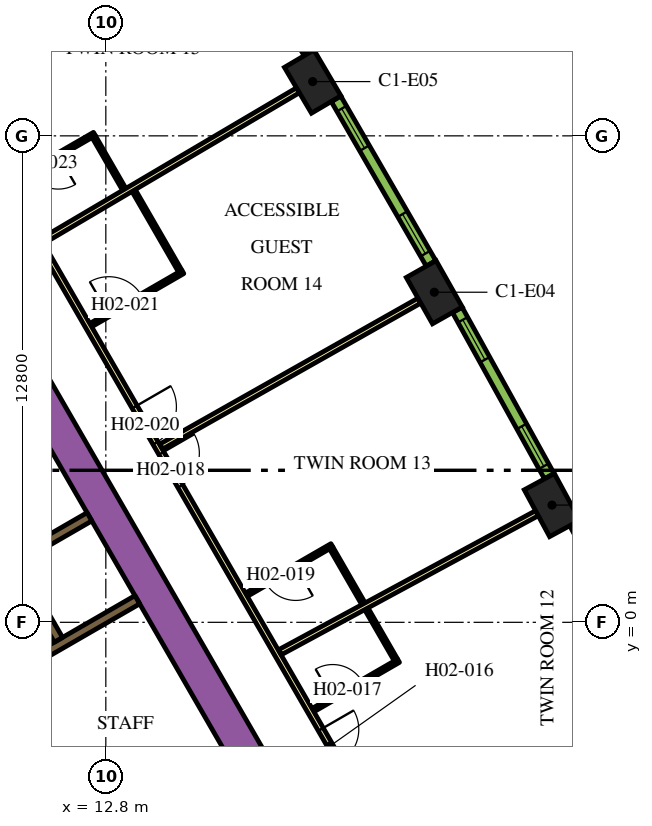
"""IFC4 building model, lengths in metres.
Left out: names, types, materials, properties, quantities, classifications, styles, units other than length and angle.
Written with IfcOpenShell. Run it as: python <this file> out.ifc"""

import sys

from ifc_helpers import new_model, si_unit, direction, frame, frame_2d, origin, origin_2d, place, context, subcontext, project, spatial, rectangle, extrude, element, fill, save


model = new_model("IFC4")
c1 = context("Model", 3, precision=1e-05, world=origin(), true_north=direction((0.0, 1.0)))
c2 = subcontext(c1, "Body", "Model", "MODEL_VIEW")
j1 = project(units=[si_unit("LENGTHUNIT", "METRE"), si_unit("PLANEANGLEUNIT", "RADIAN")], contexts=[c1])
p1 = place(None, origin())
s1 = spatial("IfcSite", under=j1, at=p1, CompositionType="ELEMENT")
p2 = place(p1, origin())
s2 = spatial("IfcBuilding", under=s1, at=p2, CompositionType="ELEMENT")
p3 = place(p2, frame((0.0, 0.0, 43.2)))
s3 = spatial("IfcBuildingStorey", under=s2, at=p3, CompositionType="ELEMENT", Elevation=43.2)
for number, where, z_axis, x_axis in (
    (1, (24.54, 3.085, 0.0), (0.0, 0.0, 1.0), (-0.476, 0.88, 0.0)),
    (2, (21.443, 8.685, 0.0), (0.0, 0.0, 1.0), (-0.492, 0.871, 0.0)),
    (3, (18.243, 14.228, 0.0), (0.0, 0.0, 1.0), (-0.508, 0.861, 0.0)),
):
    element("IfcColumn", number, at=place(p3, frame(where, z_axis=z_axis, x_axis=x_axis)), inside=s3, PredefinedType="COLUMN", context=c2, shape_type="SweptSolid", body=[
        extrude(rectangle(XDim=1.4, YDim=0.9, at=origin_2d()), origin(), (0.0, 0.0, 1.0), 3.9),
    ])
p4 = place(p3, frame((6.776, 13.364, 0.0), z_axis=(0.0, 0.0, 1.0), x_axis=(0.500004177138, -0.8660229921, 0.0)))
e4 = element("IfcWall", 4, at=p4, inside=s3, PredefinedType="SOLIDWALL", context=c2, shape_type="SweptSolid", body=[
    extrude(rectangle(XDim=20.204, YDim=0.9, at=frame_2d((10.102, 0.0))), origin(), (0.0, 0.0, 1.0), 3.9),
])
p5 = place(p3, frame((8.334, -2.964, 0.0), z_axis=(0.0, 0.0, 1.0), x_axis=(0.866016039709, -0.500016218704, 0.0)))
e5 = element("IfcWall", 5, at=p5, inside=s3, PredefinedType="SOLIDWALL", context=c2, shape_type="SweptSolid", body=[
    extrude(rectangle(XDim=7.05, YDim=0.25, at=frame_2d((3.525, 0.0))), origin(), (0.0, 0.0, 1.0), 3.9),
])
p6 = place(p3, frame((10.464, 1.677, 0.0), z_axis=(0.0, 0.0, 1.0), x_axis=(0.86605622881, 0.499946605688, 0.0)))
e6 = element("IfcWall", 6, at=p6, inside=s3, PredefinedType="SOLIDWALL", context=c2, shape_type="SweptSolid", body=[
    extrude(rectangle(XDim=2.2, YDim=0.25, at=frame_2d((1.1, 0.0))), origin(), (0.0, 0.0, 1.0), 3.9),
])
p7 = place(p3, frame((13.629, 0.594, 0.0), z_axis=(0.0, 0.0, 1.0), x_axis=(-0.86602790099, -0.499995674689, 0.0)))
e7 = element("IfcWall", 7, at=p7, inside=s3, PredefinedType="SOLIDWALL", context=c2, shape_type="SweptSolid", body=[
    extrude(rectangle(XDim=3.146, YDim=0.25, at=frame_2d((1.573, 0.0))), origin(), (0.0, 0.0, 1.0), 3.9),
])
p8 = place(p3, frame((11.553, -0.46, 0.0), z_axis=(0.0, 0.0, 1.0), x_axis=(-0.500006514828, 0.866021642414, 0.0)))
e8 = element("IfcWall", 8, at=p8, inside=s3, PredefinedType="SOLIDWALL", context=c2, shape_type="SweptSolid", body=[
    extrude(rectangle(XDim=12.35, YDim=0.25, at=frame_2d((6.175, 0.0))), origin(), (0.0, 0.0, 1.0), 3.9),
])
p9 = place(p8, frame((0.585, 0.0, 0.0)))
e9 = element("IfcOpeningElement", 9, at=p9, cuts=e8, PredefinedType="OPENING", context=c2, shape_type="SweptSolid", body=[
    extrude(rectangle(XDim=1.1, YDim=2.1, at=frame_2d((0.55, 1.05))), frame((0.0, 0.135, 0.0), z_axis=(0.0, -1.0, 0.0), x_axis=(1.0, 0.0, 0.0)), (0.0, 0.0, 1.0), 0.27),
])
p10 = place(p8, frame((3.105, 0.0, 0.0)))
e10 = element("IfcOpeningElement", 10, at=p10, cuts=e8, PredefinedType="OPENING", context=c2, shape_type="SweptSolid", body=[
    extrude(rectangle(XDim=1.1, YDim=2.1, at=frame_2d((0.55, 1.05))), frame((0.0, 0.135, 0.0), z_axis=(0.0, -1.0, 0.0), x_axis=(1.0, 0.0, 0.0)), (0.0, 0.0, 1.0), 0.27),
])
p11 = place(p8, frame((5.625, 0.0, 0.0)))
e11 = element("IfcOpeningElement", 11, at=p11, cuts=e8, PredefinedType="OPENING", context=c2, shape_type="SweptSolid", body=[
    extrude(rectangle(XDim=1.1, YDim=2.1, at=frame_2d((0.55, 1.05))), frame((0.0, 0.135, 0.0), z_axis=(0.0, -1.0, 0.0), x_axis=(1.0, 0.0, 0.0)), (0.0, 0.0, 1.0), 0.27),
])
p12 = place(p3, frame((6.163, 18.475, 0.0), z_axis=(0.0, 0.0, 1.0), x_axis=(0.500001317485, -0.866024643133, 0.0)))
e12 = element("IfcWall", 12, at=p12, inside=s3, PredefinedType="PARTITIONING", context=c2, shape_type="SweptSolid", body=[
    extrude(rectangle(XDim=25.767, YDim=0.15, at=frame_2d((12.883, 0.0))), origin(), (0.0, 0.0, 1.0), 2.75),
])
p13 = place(p12, frame((24.586, 0.0, 0.0)))
e13 = element("IfcOpeningElement", 13, at=p13, cuts=e12, PredefinedType="OPENING", context=c2, shape_type="SweptSolid", body=[
    extrude(rectangle(XDim=1.0, YDim=2.1, at=frame_2d((0.5, 1.05))), frame((0.0, 0.085, 0.0), z_axis=(0.0, -1.0, 0.0), x_axis=(1.0, 0.0, 0.0)), (0.0, 0.0, 1.0), 0.17),
])
p14 = place(p12, frame((16.196, 0.0, 0.0)))
e14 = element("IfcOpeningElement", 14, at=p14, cuts=e12, PredefinedType="OPENING", context=c2, shape_type="SweptSolid", body=[
    extrude(rectangle(XDim=1.0, YDim=2.1, at=frame_2d((0.5, 1.05))), frame((0.0, 0.085, 0.0), z_axis=(0.0, -1.0, 0.0), x_axis=(1.0, 0.0, 0.0)), (0.0, 0.0, 1.0), 0.17),
])
p15 = place(p12, frame((14.789, 0.0, 0.0)))
e15 = element("IfcOpeningElement", 15, at=p15, cuts=e12, PredefinedType="OPENING", context=c2, shape_type="SweptSolid", body=[
    extrude(rectangle(XDim=1.1, YDim=2.1, at=frame_2d((0.55, 1.05))), frame((0.0, 0.085, 0.0), z_axis=(0.0, -1.0, 0.0), x_axis=(1.0, 0.0, 0.0)), (0.0, 0.0, 1.0), 0.17),
])
p16 = place(p12, frame((3.698, 0.0, 0.0)))
e16 = element("IfcOpeningElement", 16, at=p16, cuts=e12, PredefinedType="OPENING", context=c2, shape_type="SweptSolid", body=[
    extrude(rectangle(XDim=1.0, YDim=2.1, at=frame_2d((0.5, 1.05))), frame((0.0, 0.085, 0.0), z_axis=(0.0, -1.0, 0.0), x_axis=(1.0, 0.0, 0.0)), (0.0, 0.0, 1.0), 0.17),
])
p17 = place(p12, frame((2.391, 0.0, 0.0)))
e17 = element("IfcOpeningElement", 17, at=p17, cuts=e12, PredefinedType="OPENING", context=c2, shape_type="SweptSolid", body=[
    extrude(rectangle(XDim=1.0, YDim=2.1, at=frame_2d((0.5, 1.05))), frame((0.0, 0.085, 0.0), z_axis=(0.0, -1.0, 0.0), x_axis=(1.0, 0.0, 0.0)), (0.0, 0.0, 1.0), 0.17),
])
p18 = place(p3, frame((17.856, 13.999, 0.0), z_axis=(0.0, 0.0, 1.0), x_axis=(-0.861371519381, -0.507975497047, 0.0)))
e18 = element("IfcWall", 18, at=p18, inside=s3, PredefinedType="PARTITIONING", context=c2, shape_type="SweptSolid", body=[
    extrude(rectangle(XDim=7.804, YDim=0.15, at=frame_2d((3.902, 0.0))), origin(), (0.0, 0.0, 1.0), 2.75),
])
p19 = place(p3, frame((21.052, 8.464, 0.0), z_axis=(0.0, 0.0, 1.0), x_axis=(-0.87059371954, -0.492002617368, 0.0)))
e19 = element("IfcWall", 19, at=p19, inside=s3, PredefinedType="PARTITIONING", context=c2, shape_type="SweptSolid", body=[
    extrude(rectangle(XDim=7.803, YDim=0.15, at=frame_2d((3.902, 0.0))), origin(), (0.0, 0.0, 1.0), 2.75),
])
p20 = place(p3, frame((27.134, -2.779, 0.0), z_axis=(0.0, 0.0, 1.0), x_axis=(-0.8882049501, -0.459447457951, 0.0)))
e20 = element("IfcWall", 20, at=p20, inside=s3, PredefinedType="PARTITIONING", context=c2, shape_type="SweptSolid", body=[
    extrude(rectangle(XDim=11.638, YDim=0.15, at=frame_2d((5.819, 0.0))), origin(), (0.0, 0.0, 1.0), 2.75),
])
p21 = place(p3, frame((24.145, 2.871, 0.0), z_axis=(0.0, 0.0, 1.0), x_axis=(-0.879551725039, -0.475803281809, 0.0)))
e21 = element("IfcWall", 21, at=p21, inside=s3, PredefinedType="PARTITIONING", context=c2, shape_type="SweptSolid", body=[
    extrude(rectangle(XDim=7.688, YDim=0.15, at=frame_2d((3.844, 0.0))), origin(), (0.0, 0.0, 1.0), 2.75),
])
p22 = place(p3, frame((18.25, -2.311, 0.0), z_axis=(0.0, 0.0, 1.0), x_axis=(0.866021400173, 0.500006934395, 0.0)))
e22 = element("IfcWall", 22, at=p22, inside=s3, PredefinedType="PARTITIONING", context=c2, shape_type="SweptSolid", body=[
    extrude(rectangle(XDim=2.6, YDim=0.1, at=frame_2d((1.3, 0.0))), origin(), (0.0, 0.0, 1.0), 2.75),
])
p23 = place(p22, frame((0.6, 0.0, 0.0)))
e23 = element("IfcOpeningElement", 23, at=p23, cuts=e22, PredefinedType="OPENING", context=c2, shape_type="SweptSolid", body=[
    extrude(rectangle(XDim=0.9, YDim=2.1, at=frame_2d((0.45, 1.05))), frame((0.0, 0.06, 0.0), z_axis=(0.0, -1.0, 0.0), x_axis=(1.0, 0.0, 0.0)), (0.0, 0.0, 1.0), 0.12),
])
p24 = place(p3, frame((20.434, -0.993, 0.0), z_axis=(0.0, 0.0, 1.0), x_axis=(-0.500086022567, 0.865975732936, 0.0)))
e24 = element("IfcWall", 24, at=p24, inside=s3, PredefinedType="PARTITIONING", context=c2, shape_type="SweptSolid", body=[
    extrude(rectangle(XDim=1.55, YDim=0.1, at=frame_2d((0.775, 0.0))), origin(), (0.0, 0.0, 1.0), 2.75),
])
p25 = place(p3, frame((18.749, 2.026, 0.0), z_axis=(0.0, 0.0, 1.0), x_axis=(-0.866021400173, -0.500006934395, 0.0)))
e25 = element("IfcWall", 25, at=p25, inside=s3, PredefinedType="PARTITIONING", context=c2, shape_type="SweptSolid", body=[
    extrude(rectangle(XDim=2.6, YDim=0.1, at=frame_2d((1.3, 0.0))), origin(), (0.0, 0.0, 1.0), 2.75),
])
p26 = place(p25, frame((1.1, 0.0, 0.0)))
e26 = element("IfcOpeningElement", 26, at=p26, cuts=e25, PredefinedType="OPENING", context=c2, shape_type="SweptSolid", body=[
    extrude(rectangle(XDim=0.9, YDim=2.1, at=frame_2d((0.45, 1.05))), frame((0.0, 0.06, 0.0), z_axis=(0.0, -1.0, 0.0), x_axis=(1.0, 0.0, 0.0)), (0.0, 0.0, 1.0), 0.12),
])
p27 = place(p3, frame((18.731, 1.958, 0.0), z_axis=(0.0, 0.0, 1.0), x_axis=(0.499976720371, -0.866038843867, 0.0)))
e27 = element("IfcWall", 27, at=p27, inside=s3, PredefinedType="PARTITIONING", context=c2, shape_type="SweptSolid", body=[
    extrude(rectangle(XDim=1.69, YDim=0.1, at=frame_2d((0.845, 0.0))), origin(), (0.0, 0.0, 1.0), 2.75),
])
p28 = place(p3, frame((12.402, 7.819, 0.0), z_axis=(0.0, 0.0, 1.0), x_axis=(0.866034573852, 0.49998411664, 0.0)))
e28 = element("IfcWall", 28, at=p28, inside=s3, PredefinedType="PARTITIONING", context=c2, shape_type="SweptSolid", body=[
    extrude(rectangle(XDim=2.8, YDim=0.1, at=frame_2d((1.4, 0.0))), origin(), (0.0, 0.0, 1.0), 2.75),
])
p29 = place(p28, frame((0.55, 0.0, 0.0)))
e29 = element("IfcOpeningElement", 29, at=p29, cuts=e28, PredefinedType="OPENING", context=c2, shape_type="SweptSolid", body=[
    extrude(rectangle(XDim=1.0, YDim=2.1, at=frame_2d((0.5, 1.05))), frame((0.0, 0.06, 0.0), z_axis=(0.0, -1.0, 0.0), x_axis=(1.0, 0.0, 0.0)), (0.0, 0.0, 1.0), 0.12),
])
p30 = place(p3, frame((14.759, 9.237, 0.0), z_axis=(0.0, 0.0, 1.0), x_axis=(-0.499943856944, 0.866057815567, 0.0)))
e30 = element("IfcWall", 30, at=p30, inside=s3, PredefinedType="PARTITIONING", context=c2, shape_type="SweptSolid", body=[
    extrude(rectangle(XDim=2.45, YDim=0.1, at=frame_2d((1.225, 0.0))), origin(), (0.0, 0.0, 1.0), 2.75),
])
p31 = place(p3, frame((12.5, 12.849, 0.0), z_axis=(0.0, 0.0, 1.0), x_axis=(-0.866021400173, -0.500006934395, 0.0)))
e31 = element("IfcWall", 31, at=p31, inside=s3, PredefinedType="PARTITIONING", context=c2, shape_type="SweptSolid", body=[
    extrude(rectangle(XDim=2.6, YDim=0.1, at=frame_2d((1.3, 0.0))), origin(), (0.0, 0.0, 1.0), 2.75),
])
p32 = place(p31, frame((1.1, 0.0, 0.0)))
e32 = element("IfcOpeningElement", 32, at=p32, cuts=e31, PredefinedType="OPENING", context=c2, shape_type="SweptSolid", body=[
    extrude(rectangle(XDim=0.9, YDim=2.1, at=frame_2d((0.45, 1.05))), frame((0.0, 0.06, 0.0), z_axis=(0.0, -1.0, 0.0), x_axis=(1.0, 0.0, 0.0)), (0.0, 0.0, 1.0), 0.12),
])
p33 = place(p3, frame((12.482, 12.781, 0.0), z_axis=(0.0, 0.0, 1.0), x_axis=(0.500061482766, -0.865989903783, 0.0)))
e33 = element("IfcWall", 33, at=p33, inside=s3, PredefinedType="PARTITIONING", context=c2, shape_type="SweptSolid", body=[
    extrude(rectangle(XDim=1.6, YDim=0.1, at=frame_2d((0.8, 0.0))), origin(), (0.0, 0.0, 1.0), 2.75),
])
p34 = place(p3, frame((27.475, -1.81, 0.0), z_axis=(0.0, 0.0, 1.0), x_axis=(-0.467629620899, 0.883924509026, 0.0)))
e34 = element("IfcWall", 34, at=p34, inside=s3, PredefinedType="SOLIDWALL", context=c2, shape_type="SweptSolid", body=[
    extrude(rectangle(XDim=4.998, YDim=0.29, at=frame_2d((2.499, 0.0))), origin(), (0.0, 0.0, 1.0), 3.65),
])
p35 = place(p34, frame((0.297, 0.0, 0.9)))
e35 = element("IfcOpeningElement", 35, at=p35, cuts=e34, PredefinedType="OPENING", context=c2, shape_type="SweptSolid", body=[
    extrude(rectangle(XDim=1.2, YDim=2.15, at=frame_2d((0.6, 1.075))), frame((0.0, 0.155, 0.0), z_axis=(0.0, -1.0, 0.0), x_axis=(1.0, 0.0, 0.0)), (0.0, 0.0, 1.0), 0.31),
])
p36 = place(p34, frame((3.501, 0.0, 0.9)))
e36 = element("IfcOpeningElement", 36, at=p36, cuts=e34, PredefinedType="OPENING", context=c2, shape_type="SweptSolid", body=[
    extrude(rectangle(XDim=1.2, YDim=2.15, at=frame_2d((0.6, 1.075))), frame((0.0, 0.155, 0.0), z_axis=(0.0, -1.0, 0.0), x_axis=(1.0, 0.0, 0.0)), (0.0, 0.0, 1.0), 0.31),
])
p37 = place(p3, frame((24.468, 3.846, 0.0), z_axis=(0.0, 0.0, 1.0), x_axis=(-0.483912572871, 0.875116347589, 0.0)))
e37 = element("IfcWall", 37, at=p37, inside=s3, PredefinedType="SOLIDWALL", context=c2, shape_type="SweptSolid", body=[
    extrude(rectangle(XDim=4.998, YDim=0.29, at=frame_2d((2.499, 0.0))), origin(), (0.0, 0.0, 1.0), 3.65),
])
p38 = place(p37, frame((0.297, 0.0, 0.9)))
e38 = element("IfcOpeningElement", 38, at=p38, cuts=e37, PredefinedType="OPENING", context=c2, shape_type="SweptSolid", body=[
    extrude(rectangle(XDim=1.2, YDim=2.15, at=frame_2d((0.6, 1.075))), frame((0.0, 0.155, 0.0), z_axis=(0.0, -1.0, 0.0), x_axis=(1.0, 0.0, 0.0)), (0.0, 0.0, 1.0), 0.31),
])
p39 = place(p37, frame((3.501, 0.0, 0.9)))
e39 = element("IfcOpeningElement", 39, at=p39, cuts=e37, PredefinedType="OPENING", context=c2, shape_type="SweptSolid", body=[
    extrude(rectangle(XDim=1.2, YDim=2.15, at=frame_2d((0.6, 1.075))), frame((0.0, 0.155, 0.0), z_axis=(0.0, -1.0, 0.0), x_axis=(1.0, 0.0, 0.0)), (0.0, 0.0, 1.0), 0.31),
])
p40 = place(p3, frame((21.357, 9.445, 0.0), z_axis=(0.0, 0.0, 1.0), x_axis=(-0.50002123722, 0.866013142123, 0.0)))
e40 = element("IfcWall", 40, at=p40, inside=s3, PredefinedType="SOLIDWALL", context=c2, shape_type="SweptSolid", body=[
    extrude(rectangle(XDim=4.998, YDim=0.29, at=frame_2d((2.499, 0.0))), origin(), (0.0, 0.0, 1.0), 3.65),
])
p41 = place(p40, frame((0.297, 0.0, 0.9)))
e41 = element("IfcOpeningElement", 41, at=p41, cuts=e40, PredefinedType="OPENING", context=c2, shape_type="SweptSolid", body=[
    extrude(rectangle(XDim=1.2, YDim=2.15, at=frame_2d((0.6, 1.075))), frame((0.0, 0.155, 0.0), z_axis=(0.0, -1.0, 0.0), x_axis=(1.0, 0.0, 0.0)), (0.0, 0.0, 1.0), 0.31),
])
p42 = place(p40, frame((3.501, 0.0, 0.9)))
e42 = element("IfcOpeningElement", 42, at=p42, cuts=e40, PredefinedType="OPENING", context=c2, shape_type="SweptSolid", body=[
    extrude(rectangle(XDim=1.2, YDim=2.15, at=frame_2d((0.6, 1.075))), frame((0.0, 0.155, 0.0), z_axis=(0.0, -1.0, 0.0), x_axis=(1.0, 0.0, 0.0)), (0.0, 0.0, 1.0), 0.31),
])
p43 = place(p3, frame((18.143, 14.986, 0.0), z_axis=(0.0, 0.0, 1.0), x_axis=(-0.515938796285, 0.856625448191, 0.0)))
e43 = element("IfcWall", 43, at=p43, inside=s3, PredefinedType="SOLIDWALL", context=c2, shape_type="SweptSolid", body=[
    extrude(rectangle(XDim=4.998, YDim=0.29, at=frame_2d((2.499, 0.0))), origin(), (0.0, 0.0, 1.0), 3.65),
])
p44 = place(p43, frame((0.297, 0.0, 0.9)))
e44 = element("IfcOpeningElement", 44, at=p44, cuts=e43, PredefinedType="OPENING", context=c2, shape_type="SweptSolid", body=[
    extrude(rectangle(XDim=1.2, YDim=2.15, at=frame_2d((0.6, 1.075))), frame((0.0, 0.155, 0.0), z_axis=(0.0, -1.0, 0.0), x_axis=(1.0, 0.0, 0.0)), (0.0, 0.0, 1.0), 0.31),
])
p45 = place(p43, frame((3.501, 0.0, 0.9)))
e45 = element("IfcOpeningElement", 45, at=p45, cuts=e43, PredefinedType="OPENING", context=c2, shape_type="SweptSolid", body=[
    extrude(rectangle(XDim=1.2, YDim=2.15, at=frame_2d((0.6, 1.075))), frame((0.0, 0.155, 0.0), z_axis=(0.0, -1.0, 0.0), x_axis=(1.0, 0.0, 0.0)), (0.0, 0.0, 1.0), 0.31),
])
p46 = place(p13, origin())
e46 = element("IfcDoor", 46, at=p46, inside=s3, OperationType="SINGLE_SWING_RIGHT", PredefinedType="DOOR", context=c2, shape_type="SweptSolid", body=[
    extrude(rectangle(XDim=1.0, YDim=2.1, at=frame_2d((0.5, 1.05))), frame((0.0, 0.025, 0.0), z_axis=(0.0, -1.0, 0.0), x_axis=(1.0, 0.0, 0.0)), (0.0, 0.0, 1.0), 0.05),
])
fill(e13, e46)
p47 = place(p23, origin())
e47 = element("IfcDoor", 47, at=p47, inside=s3, OperationType="SINGLE_SWING_RIGHT", PredefinedType="DOOR", context=c2, shape_type="SweptSolid", body=[
    extrude(rectangle(XDim=0.9, YDim=2.1, at=frame_2d((0.45, 1.05))), frame((0.0, 0.025, 0.0), z_axis=(0.0, -1.0, 0.0), x_axis=(1.0, 0.0, 0.0)), (0.0, 0.0, 1.0), 0.05),
])
fill(e23, e47)
p48 = place(p14, origin())
e48 = element("IfcDoor", 48, at=p48, inside=s3, OperationType="SINGLE_SWING_LEFT", PredefinedType="DOOR", context=c2, shape_type="SweptSolid", body=[
    extrude(rectangle(XDim=1.0, YDim=2.1, at=frame_2d((0.5, 1.05))), frame((0.0, 0.025, 0.0), z_axis=(0.0, -1.0, 0.0), x_axis=(1.0, 0.0, 0.0)), (0.0, 0.0, 1.0), 0.05),
])
fill(e14, e48)
p49 = place(p26, origin())
e49 = element("IfcDoor", 49, at=p49, inside=s3, OperationType="SINGLE_SWING_LEFT", PredefinedType="DOOR", context=c2, shape_type="SweptSolid", body=[
    extrude(rectangle(XDim=0.9, YDim=2.1, at=frame_2d((0.45, 1.05))), frame((0.0, 0.025, 0.0), z_axis=(0.0, -1.0, 0.0), x_axis=(1.0, 0.0, 0.0)), (0.0, 0.0, 1.0), 0.05),
])
fill(e26, e49)
p50 = place(p15, origin())
e50 = element("IfcDoor", 50, at=p50, inside=s3, OperationType="SINGLE_SWING_RIGHT", PredefinedType="DOOR", context=c2, shape_type="SweptSolid", body=[
    extrude(rectangle(XDim=1.1, YDim=2.1, at=frame_2d((0.55, 1.05))), frame((0.0, 0.025, 0.0), z_axis=(0.0, -1.0, 0.0), x_axis=(1.0, 0.0, 0.0)), (0.0, 0.0, 1.0), 0.05),
])
fill(e15, e50)
p51 = place(p29, origin())
e51 = element("IfcDoor", 51, at=p51, inside=s3, OperationType="SINGLE_SWING_LEFT", PredefinedType="DOOR", context=c2, shape_type="SweptSolid", body=[
    extrude(rectangle(XDim=1.0, YDim=2.1, at=frame_2d((0.5, 1.05))), frame((0.0, 0.025, 0.0), z_axis=(0.0, -1.0, 0.0), x_axis=(1.0, 0.0, 0.0)), (0.0, 0.0, 1.0), 0.05),
])
fill(e29, e51)
p52 = place(p32, origin())
e52 = element("IfcDoor", 52, at=p52, inside=s3, OperationType="SINGLE_SWING_RIGHT", PredefinedType="DOOR", context=c2, shape_type="SweptSolid", body=[
    extrude(rectangle(XDim=0.9, YDim=2.1, at=frame_2d((0.45, 1.05))), frame((0.0, 0.025, 0.0), z_axis=(0.0, -1.0, 0.0), x_axis=(1.0, 0.0, 0.0)), (0.0, 0.0, 1.0), 0.05),
])
fill(e32, e52)
p53 = place(p38, origin())
e53 = element("IfcWindow", 53, at=p53, inside=s3, PartitioningType="DOUBLE_PANEL_VERTICAL", PredefinedType="WINDOW", context=c2, shape_type="SweptSolid", body=[
    extrude(rectangle(XDim=1.2, YDim=2.15, at=frame_2d((0.6, 1.075))), frame((0.0, 0.015, 0.0), z_axis=(0.0, -1.0, 0.0), x_axis=(1.0, 0.0, 0.0)), (0.0, 0.0, 1.0), 0.06),
])
fill(e38, e53)
p54 = place(p39, origin())
e54 = element("IfcWindow", 54, at=p54, inside=s3, PartitioningType="DOUBLE_PANEL_VERTICAL", PredefinedType="WINDOW", context=c2, shape_type="SweptSolid", body=[
    extrude(rectangle(XDim=1.2, YDim=2.15, at=frame_2d((0.6, 1.075))), frame((0.0, 0.015, 0.0), z_axis=(0.0, -1.0, 0.0), x_axis=(1.0, 0.0, 0.0)), (0.0, 0.0, 1.0), 0.06),
])
fill(e39, e54)
p55 = place(p41, origin())
e55 = element("IfcWindow", 55, at=p55, inside=s3, PartitioningType="DOUBLE_PANEL_VERTICAL", PredefinedType="WINDOW", context=c2, shape_type="SweptSolid", body=[
    extrude(rectangle(XDim=1.2, YDim=2.15, at=frame_2d((0.6, 1.075))), frame((0.0, 0.015, 0.0), z_axis=(0.0, -1.0, 0.0), x_axis=(1.0, 0.0, 0.0)), (0.0, 0.0, 1.0), 0.06),
])
fill(e41, e55)
p56 = place(p42, origin())
e56 = element("IfcWindow", 56, at=p56, inside=s3, PartitioningType="DOUBLE_PANEL_VERTICAL", PredefinedType="WINDOW", context=c2, shape_type="SweptSolid", body=[
    extrude(rectangle(XDim=1.2, YDim=2.15, at=frame_2d((0.6, 1.075))), frame((0.0, 0.015, 0.0), z_axis=(0.0, -1.0, 0.0), x_axis=(1.0, 0.0, 0.0)), (0.0, 0.0, 1.0), 0.06),
])
fill(e42, e56)
save(model, sys.argv[1])
